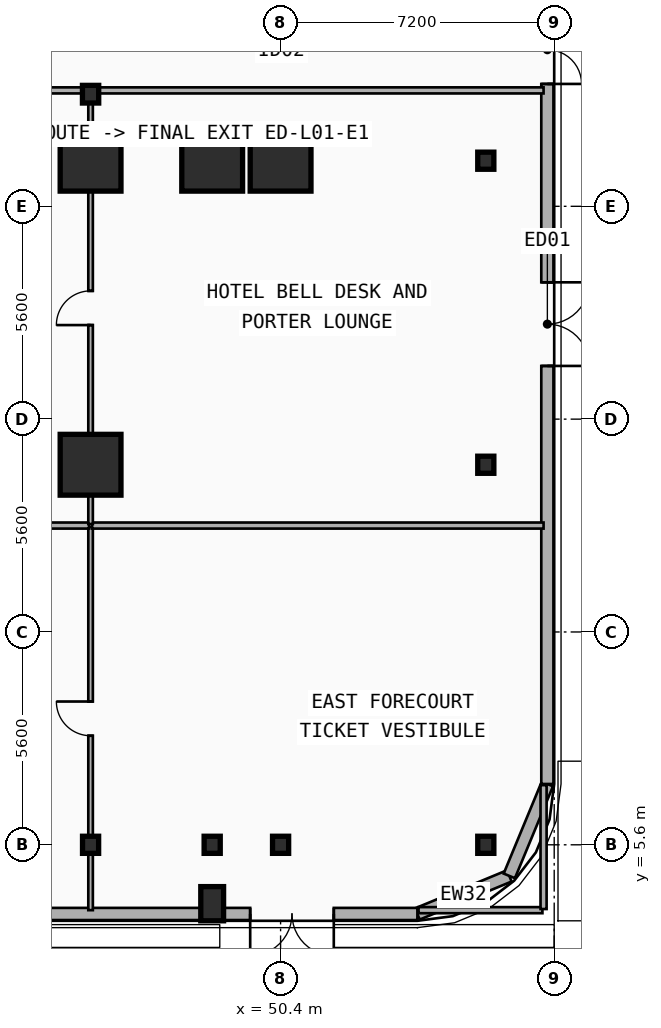
"""IFC4 building model, lengths in metres.
Left out: names, types, materials, properties, quantities, classifications, styles, units other than length and angle.
Written with IfcOpenShell. Run it as: python <this file> out.ifc"""

import sys

from ifc_helpers import new_model, si_unit, direction, frame, frame_2d, origin, origin_2d, place, context, subcontext, project, spatial, rectangle, i_section, extrude, element, fill, save


model = new_model("IFC4")
c1 = context("Model", 3, precision=1e-05, world=origin(), true_north=direction((0.0, 1.0)))
c2 = subcontext(c1, "Body", "Model", "MODEL_VIEW")
j1 = project(units=[si_unit("LENGTHUNIT", "METRE"), si_unit("PLANEANGLEUNIT", "RADIAN")], contexts=[c1])
p1 = place(None, origin())
s1 = spatial("IfcSite", under=j1, at=p1, CompositionType="ELEMENT")
p2 = place(p1, origin())
s2 = spatial("IfcBuilding", under=s1, at=p2, CompositionType="ELEMENT")
p3 = place(p2, origin())
s3 = spatial("IfcBuildingStorey", under=s2, at=p3, CompositionType="ELEMENT", Elevation=0.0)
p4 = place(p3, frame((45.4, 25.35, 0.0), z_axis=(0.0, 0.0, 1.0), x_axis=(1.0, 0.0, 0.0)))
e1 = element("IfcColumn", 1, at=p4, inside=s3, PredefinedType="COLUMN", context=c2, shape_type="SweptSolid", body=[
    extrude(i_section(OverallWidth=0.428, OverallDepth=0.465, WebThickness=0.045, FlangeThickness=0.073, FilletRadius=0.015, at=origin_2d()), origin(), (0.0, 0.0, 1.0), 5.4),
])
p5 = place(p3, frame((45.4, 5.6, 0.0), z_axis=(0.0, 0.0, 1.0), x_axis=(1.0, 0.0, 0.0)))
e2 = element("IfcColumn", 2, at=p5, inside=s3, PredefinedType="COLUMN", context=c2, shape_type="SweptSolid", body=[
    extrude(i_section(OverallWidth=0.424, OverallDepth=0.45, WebThickness=0.041, FlangeThickness=0.065, FilletRadius=0.015, at=origin_2d()), origin(), (0.0, 0.0, 1.0), 5.4),
])
for number, where, z_axis, x_axis in (
    (3, (45.4, 15.6, 0.0), (0.0, 0.0, 1.0), (1.0, 0.0, 0.0)),
    (4, (45.4, 23.6, 0.0), (0.0, 0.0, 1.0), (1.0, 0.0, 0.0)),
):
    element("IfcColumn", number, at=place(p3, frame(where, z_axis=z_axis, x_axis=x_axis)), inside=s3, PredefinedType="COLUMN", context=c2, shape_type="SweptSolid", body=[
        extrude(rectangle(XDim=1.6, YDim=1.6, at=origin_2d()), origin(), (0.0, 0.0, 1.0), 5.4),
    ])
p6 = place(p3, frame((48.6, 5.6, 0.0), z_axis=(0.0, 0.0, 1.0), x_axis=(1.0, 0.0, 0.0)))
e5 = element("IfcColumn", 5, at=p6, inside=s3, PredefinedType="COLUMN", context=c2, shape_type="SweptSolid", body=[
    extrude(i_section(OverallWidth=0.424, OverallDepth=0.45, WebThickness=0.041, FlangeThickness=0.065, FilletRadius=0.015, at=origin_2d()), origin(), (0.0, 0.0, 1.0), 5.4),
])
p7 = place(p3, frame((48.6, 23.6, 0.0), z_axis=(0.0, 0.0, 1.0), x_axis=(1.0, 0.0, 0.0)))
e6 = element("IfcColumn", 6, at=p7, inside=s3, PredefinedType="COLUMN", context=c2, shape_type="SweptSolid", body=[
    extrude(rectangle(XDim=1.6, YDim=1.6, at=origin_2d()), origin(), (0.0, 0.0, 1.0), 5.4),
])
p8 = place(p3, frame((50.4, 5.6, 0.0), z_axis=(0.0, 0.0, 1.0), x_axis=(1.0, 0.0, 0.0)))
e7 = element("IfcColumn", 7, at=p8, inside=s3, PredefinedType="COLUMN", context=c2, shape_type="SweptSolid", body=[
    extrude(i_section(OverallWidth=0.424, OverallDepth=0.45, WebThickness=0.041, FlangeThickness=0.065, FilletRadius=0.015, at=origin_2d()), origin(), (0.0, 0.0, 1.0), 5.4),
])
p9 = place(p3, frame((50.4, 23.6, 0.0), z_axis=(0.0, 0.0, 1.0), x_axis=(1.0, 0.0, 0.0)))
e8 = element("IfcColumn", 8, at=p9, inside=s3, PredefinedType="COLUMN", context=c2, shape_type="SweptSolid", body=[
    extrude(rectangle(XDim=1.6, YDim=1.6, at=origin_2d()), origin(), (0.0, 0.0, 1.0), 5.4),
])
for number, where, z_axis, x_axis in (
    (9, (55.8, 5.6, 0.0), (0.0, 0.0, 1.0), (1.0, 0.0, 0.0)),
    (10, (55.8, 15.6, 0.0), (0.0, 0.0, 1.0), (1.0, 0.0, 0.0)),
    (11, (55.8, 23.6, 0.0), (0.0, 0.0, 1.0), (1.0, 0.0, 0.0)),
):
    element("IfcColumn", number, at=place(p3, frame(where, z_axis=z_axis, x_axis=x_axis)), inside=s3, PredefinedType="COLUMN", context=c2, shape_type="SweptSolid", body=[
        extrude(i_section(OverallWidth=0.424, OverallDepth=0.45, WebThickness=0.041, FlangeThickness=0.065, FilletRadius=0.015, at=origin_2d()), origin(), (0.0, 0.0, 1.0), 5.4),
    ])
p10 = place(p3, frame((48.6, 4.05, 0.0), z_axis=(0.0, 0.0, 1.0), x_axis=(1.0, 0.0, 0.0)))
e12 = element("IfcColumn", 12, at=p10, inside=s3, PredefinedType="PILASTER", context=c2, shape_type="SweptSolid", body=[
    extrude(rectangle(XDim=0.6, YDim=0.9, at=origin_2d()), origin(), (0.0, 0.0, 1.0), 5.4),
])
for number, where, z_axis, x_axis in (
    (13, (56.418, 4.782, 0.0), (0.0, 0.0, 1.0), (-0.924, -0.383, 0.0)),
    (14, (57.42, 7.2, 0.0), (0.0, 0.0, 1.0), (-0.383, -0.924, 0.0)),
):
    element("IfcWall", number, at=place(p3, frame(where, z_axis=z_axis, x_axis=x_axis)), inside=s3, PredefinedType="SOLIDWALL", context=c2, shape_type="SweptSolid", body=[
        extrude(rectangle(XDim=2.617, YDim=0.32, at=frame_2d((1.309, 0.0))), origin(), (0.0, 0.0, 1.0), 5.1),
    ])
p11 = place(p3, frame((57.42, 41.6, 0.0), z_axis=(0.0, 0.0, 1.0), x_axis=(0.0, -1.0, 0.0)))
e15 = element("IfcWall", 15, at=p11, inside=s3, PredefinedType="SOLIDWALL", context=c2, shape_type="SweptSolid", body=[
    extrude(rectangle(XDim=34.4, YDim=0.32, at=frame_2d((17.2, 0.0))), origin(), (0.0, 0.0, 1.0), 5.1),
])
p12 = place(p11, frame((14.18, 0.0, 0.0)))
e16 = element("IfcOpeningElement", 16, at=p12, cuts=e15, PredefinedType="OPENING", context=c2, shape_type="SweptSolid", body=[
    extrude(rectangle(XDim=1.8, YDim=2.3, at=frame_2d((0.9, 1.15))), frame((0.0, 0.17, 0.0), z_axis=(0.0, -1.0, 0.0), x_axis=(1.0, 0.0, 0.0)), (0.0, 0.0, 1.0), 0.34),
])
p13 = place(p11, frame((21.2, 0.0, 0.0)))
e17 = element("IfcOpeningElement", 17, at=p13, cuts=e15, PredefinedType="OPENING", context=c2, shape_type="SweptSolid", body=[
    extrude(rectangle(XDim=2.2, YDim=2.4, at=frame_2d((1.1, 1.2))), frame((0.0, 0.17, 0.0), z_axis=(0.0, -1.0, 0.0), x_axis=(1.0, 0.0, 0.0)), (0.0, 0.0, 1.0), 0.34),
])
p14 = place(p11, frame((8.6, 0.0, 0.0)))
e18 = element("IfcOpeningElement", 18, at=p14, cuts=e15, PredefinedType="OPENING", context=c2, shape_type="SweptSolid", body=[
    extrude(rectangle(XDim=3.6, YDim=3.2, at=frame_2d((1.8, 1.6))), frame((0.0, 0.17, 0.0), z_axis=(0.0, -1.0, 0.0), x_axis=(1.0, 0.0, 0.0)), (0.0, 0.0, 1.0), 0.34),
])
p15 = place(p3, frame((54.0, 3.78, 0.0), z_axis=(0.0, 0.0, 1.0), x_axis=(-1.0, 0.0, 0.0)))
e19 = element("IfcWall", 19, at=p15, inside=s3, PredefinedType="SOLIDWALL", context=c2, shape_type="SweptSolid", body=[
    extrude(rectangle(XDim=16.95, YDim=0.32, at=frame_2d((8.475, 0.0))), origin(), (0.0, 0.0, 1.0), 4.43),
])
p16 = place(p15, frame((2.2, 0.0, 0.0)))
e20 = element("IfcOpeningElement", 20, at=p16, cuts=e19, PredefinedType="OPENING", context=c2, shape_type="SweptSolid", body=[
    extrude(rectangle(XDim=2.2, YDim=2.4, at=frame_2d((1.1, 1.2))), frame((0.0, 0.17, 0.0), z_axis=(0.0, -1.0, 0.0), x_axis=(1.0, 0.0, 0.0)), (0.0, 0.0, 1.0), 0.34),
])
p17 = place(p15, frame((9.8, 0.0, 0.0)))
e21 = element("IfcOpeningElement", 21, at=p17, cuts=e19, PredefinedType="OPENING", context=c2, shape_type="SweptSolid", body=[
    extrude(rectangle(XDim=2.2, YDim=2.4, at=frame_2d((1.1, 1.2))), frame((0.0, 0.17, 0.0), z_axis=(0.0, -1.0, 0.0), x_axis=(1.0, 0.0, 0.0)), (0.0, 0.0, 1.0), 0.34),
])
p18 = place(p3, frame((36.39, 25.45, 0.0), z_axis=(0.0, 0.0, 1.0), x_axis=(1.0, 0.0, 0.0)))
e22 = element("IfcWall", 22, at=p18, inside=s3, PredefinedType="PARTITIONING", context=c2, shape_type="SweptSolid", body=[
    extrude(rectangle(XDim=8.97, YDim=0.16, at=frame_2d((4.485, 0.0))), origin(), (0.0, 0.0, 1.0), 4.266),
])
p19 = place(p18, frame((3.685, 0.0, 0.0)))
e23 = element("IfcOpeningElement", 23, at=p19, cuts=e22, PredefinedType="OPENING", context=c2, shape_type="SweptSolid", body=[
    extrude(rectangle(XDim=1.6, YDim=2.2, at=frame_2d((0.8, 1.1))), frame((0.0, 0.09, 0.0), z_axis=(0.0, -1.0, 0.0), x_axis=(1.0, 0.0, 0.0)), (0.0, 0.0, 1.0), 0.18),
])
p20 = place(p3, frame((45.44, 25.45, 0.0), z_axis=(0.0, 0.0, 1.0), x_axis=(1.0, 0.0, 0.0)))
e24 = element("IfcWall", 24, at=p20, inside=s3, PredefinedType="PARTITIONING", context=c2, shape_type="SweptSolid", body=[
    extrude(rectangle(XDim=11.88, YDim=0.16, at=frame_2d((5.94, 0.0))), origin(), (0.0, 0.0, 1.0), 4.266),
])
p21 = place(p3, frame((45.4, 3.88, 0.0), z_axis=(0.0, 0.0, 1.0), x_axis=(0.0, 1.0, 0.0)))
e25 = element("IfcWall", 25, at=p21, inside=s3, PredefinedType="PARTITIONING", context=c2, shape_type="SweptSolid", body=[
    extrude(rectangle(XDim=10.08, YDim=0.12, at=frame_2d((5.04, 0.0))), origin(), (0.0, 0.0, 1.0), 4.266),
])
p22 = place(p21, frame((4.59, 0.0, 0.0)))
e26 = element("IfcOpeningElement", 26, at=p22, cuts=e25, PredefinedType="OPENING", context=c2, shape_type="SweptSolid", body=[
    extrude(rectangle(XDim=0.9, YDim=2.1, at=frame_2d((0.45, 1.05))), frame((0.0, 0.07, 0.0), z_axis=(0.0, -1.0, 0.0), x_axis=(1.0, 0.0, 0.0)), (0.0, 0.0, 1.0), 0.14),
])
p23 = place(p3, frame((36.39, 14.0, 0.0), z_axis=(0.0, 0.0, 1.0), x_axis=(1.0, 0.0, 0.0)))
e27 = element("IfcWall", 27, at=p23, inside=s3, PredefinedType="PARTITIONING", context=c2, shape_type="SweptSolid", body=[
    extrude(rectangle(XDim=8.97, YDim=0.16, at=frame_2d((4.485, 0.0))), origin(), (0.0, 0.0, 1.0), 4.266),
])
p24 = place(p3, frame((45.44, 14.0, 0.0), z_axis=(0.0, 0.0, 1.0), x_axis=(1.0, 0.0, 0.0)))
e28 = element("IfcWall", 28, at=p24, inside=s3, PredefinedType="PARTITIONING", context=c2, shape_type="SweptSolid", body=[
    extrude(rectangle(XDim=11.88, YDim=0.16, at=frame_2d((5.94, 0.0))), origin(), (0.0, 0.0, 1.0), 4.266),
])
p25 = place(p3, frame((45.4, 14.04, 0.0), z_axis=(0.0, 0.0, 1.0), x_axis=(0.0, 1.0, 0.0)))
e29 = element("IfcWall", 29, at=p25, inside=s3, PredefinedType="PARTITIONING", context=c2, shape_type="SweptSolid", body=[
    extrude(rectangle(XDim=11.37, YDim=0.12, at=frame_2d((5.685, 0.0))), origin(), (0.0, 0.0, 1.0), 4.072),
])
p26 = place(p25, frame((5.235, 0.0, 0.0)))
e30 = element("IfcOpeningElement", 30, at=p26, cuts=e29, PredefinedType="OPENING", context=c2, shape_type="SweptSolid", body=[
    extrude(rectangle(XDim=0.9, YDim=2.1, at=frame_2d((0.45, 1.05))), frame((0.0, 0.07, 0.0), z_axis=(0.0, -1.0, 0.0), x_axis=(1.0, 0.0, 0.0)), (0.0, 0.0, 1.0), 0.14),
])
for number, where, z_axis, x_axis in (
    (31, (54.03, 3.88, 0.0), (0.0, 0.0, 1.0), (1.0, 0.0, 0.0)),
    (32, (57.32, 3.91, 0.0), (0.0, 0.0, 1.0), (0.0, 1.0, 0.0)),
):
    element("IfcWall", number, at=place(p3, frame(where, z_axis=z_axis, x_axis=x_axis)), inside=s3, PredefinedType="PARTITIONING", context=c2, shape_type="SweptSolid", body=[
        extrude(rectangle(XDim=3.26, YDim=0.16, at=frame_2d((1.63, 0.0))), origin(), (0.0, 0.0, 1.0), 5.1),
    ])
p27 = place(p12, origin())
e33 = element("IfcDoor", 33, at=p27, inside=s3, OperationType="SINGLE_SWING_LEFT", PredefinedType="DOOR", context=c2, shape_type="SweptSolid", body=[
    extrude(rectangle(XDim=1.8, YDim=2.3, at=frame_2d((0.9, 1.15))), frame((0.0, 0.025, 0.0), z_axis=(0.0, -1.0, 0.0), x_axis=(1.0, 0.0, 0.0)), (0.0, 0.0, 1.0), 0.05),
])
fill(e16, e33)
p28 = place(p13, origin())
e34 = element("IfcDoor", 34, at=p28, inside=s3, OperationType="SINGLE_SWING_LEFT", PredefinedType="DOOR", context=c2, shape_type="SweptSolid", body=[
    extrude(rectangle(XDim=2.2, YDim=2.4, at=frame_2d((1.1, 1.2))), frame((0.0, 0.025, 0.0), z_axis=(0.0, -1.0, 0.0), x_axis=(1.0, 0.0, 0.0)), (0.0, 0.0, 1.0), 0.05),
])
fill(e17, e34)
p29 = place(p16, origin())
e35 = element("IfcDoor", 35, at=p29, inside=s3, OperationType="SINGLE_SWING_LEFT", PredefinedType="DOOR", context=c2, shape_type="SweptSolid", body=[
    extrude(rectangle(XDim=2.2, YDim=2.4, at=frame_2d((1.1, 1.2))), frame((0.0, 0.025, 0.0), z_axis=(0.0, -1.0, 0.0), x_axis=(1.0, 0.0, 0.0)), (0.0, 0.0, 1.0), 0.05),
])
fill(e20, e35)
p30 = place(p22, origin())
e36 = element("IfcDoor", 36, at=p30, inside=s3, OperationType="SINGLE_SWING_RIGHT", PredefinedType="DOOR", context=c2, shape_type="SweptSolid", body=[
    extrude(rectangle(XDim=0.9, YDim=2.1, at=frame_2d((0.45, 1.05))), frame((0.0, 0.025, 0.0), z_axis=(0.0, -1.0, 0.0), x_axis=(1.0, 0.0, 0.0)), (0.0, 0.0, 1.0), 0.05),
])
fill(e26, e36)
p31 = place(p26, origin())
e37 = element("IfcDoor", 37, at=p31, inside=s3, OperationType="SINGLE_SWING_LEFT", PredefinedType="DOOR", context=c2, shape_type="SweptSolid", body=[
    extrude(rectangle(XDim=0.9, YDim=2.1, at=frame_2d((0.45, 1.05))), frame((0.0, 0.025, 0.0), z_axis=(0.0, -1.0, 0.0), x_axis=(1.0, 0.0, 0.0)), (0.0, 0.0, 1.0), 0.05),
])
fill(e30, e37)
save(model, sys.argv[1])
